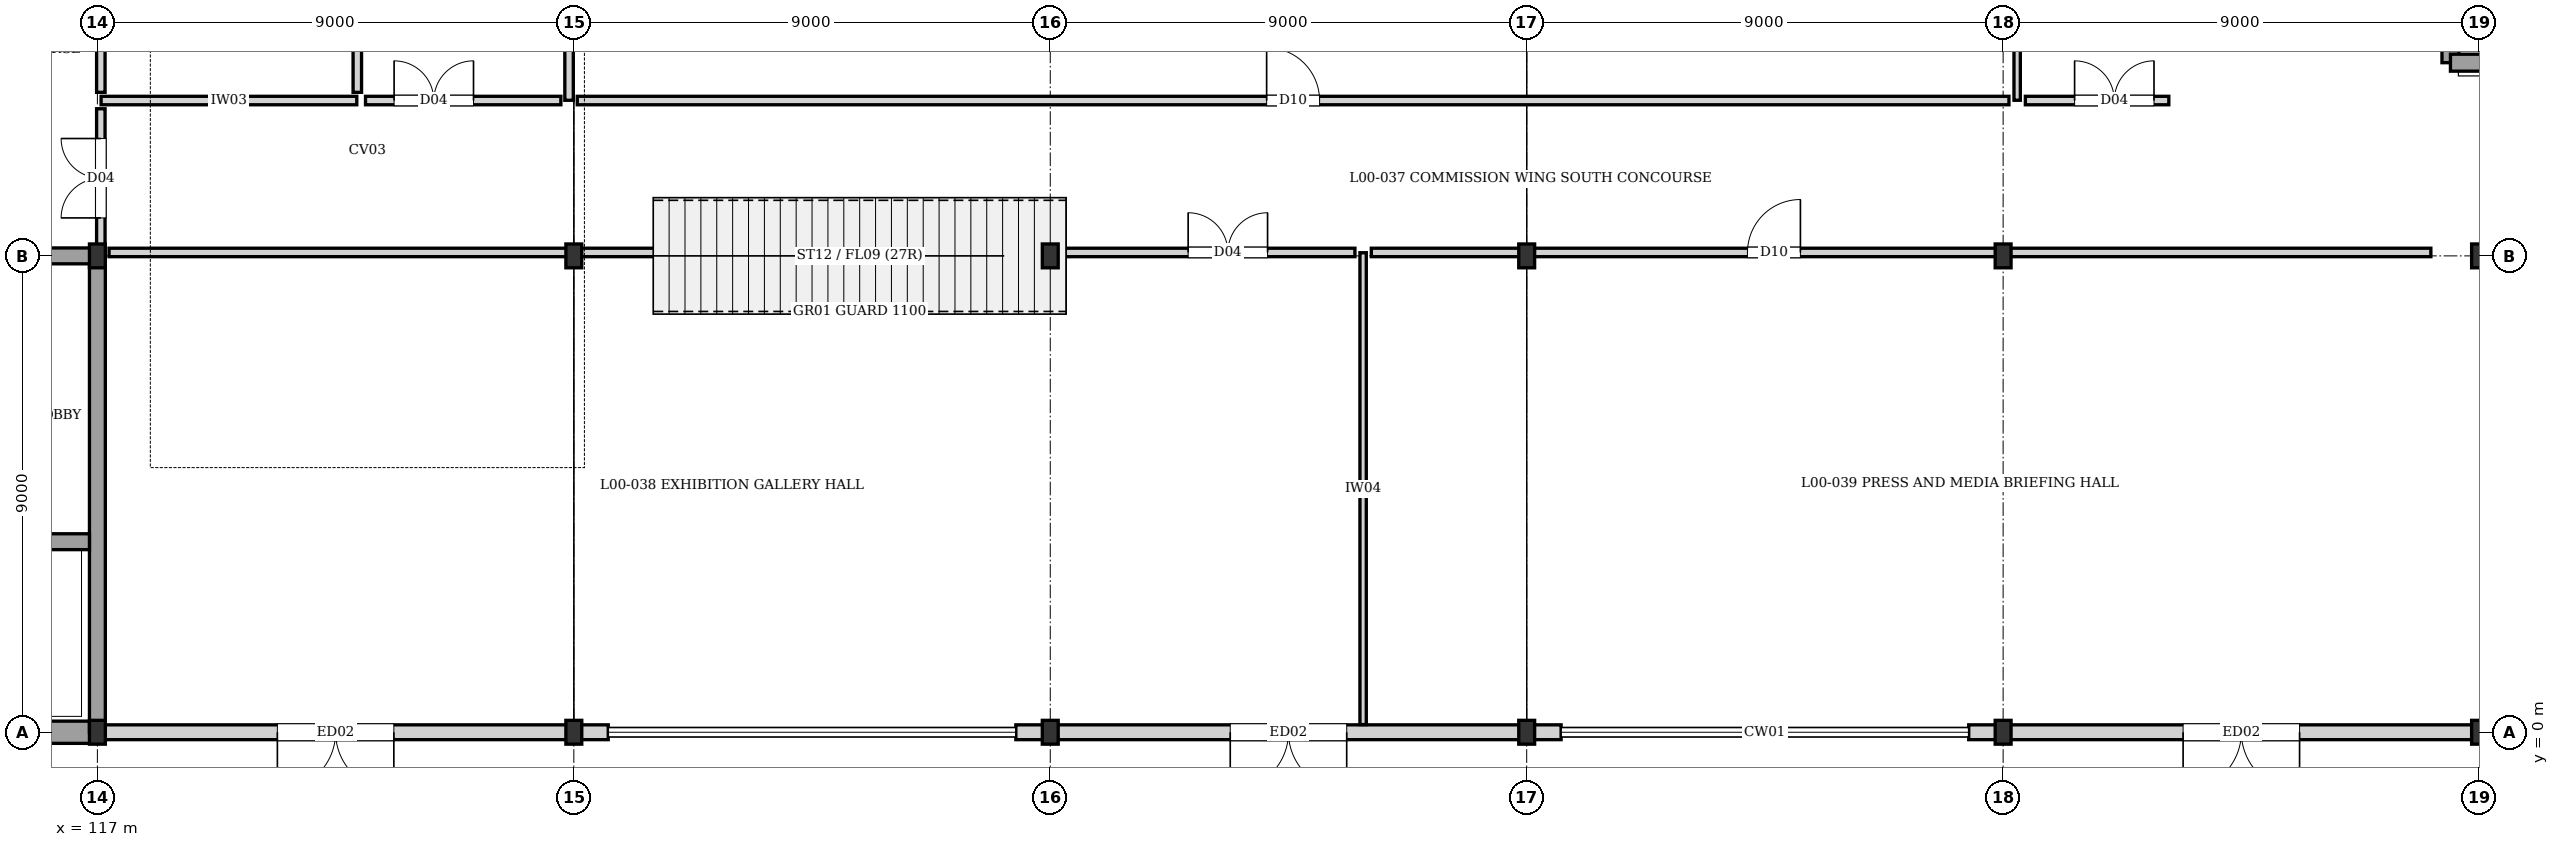
"""IFC4 building model, lengths in metres.
Left out: names, types, materials, properties, quantities, classifications, styles, units other than length and angle.
Written with IfcOpenShell. Run it as: python <this file> out.ifc"""

import sys

from ifc_helpers import new_model, si_unit, direction, frame, frame_2d, origin, origin_2d, place, context, subcontext, project, spatial, rectangle, i_section, extrude, element, fill, save


model = new_model("IFC4")
c1 = context("Model", 3, precision=1e-05, world=origin(), true_north=direction((0.0, 1.0)))
c2 = subcontext(c1, "Body", "Model", "MODEL_VIEW")
j1 = project(units=[si_unit("LENGTHUNIT", "METRE"), si_unit("PLANEANGLEUNIT", "RADIAN")], contexts=[c1])
p1 = place(None, origin())
s1 = spatial("IfcSite", under=j1, at=p1, CompositionType="ELEMENT")
p2 = place(p1, origin())
s2 = spatial("IfcBuilding", under=s1, at=p2, CompositionType="ELEMENT")
p3 = place(p2, origin())
s3 = spatial("IfcBuildingStorey", under=s2, at=p3, CompositionType="ELEMENT", Elevation=0.0)
for number, where, z_axis, x_axis in (
    (1, (117.0, 0.0, 0.0), (0.0, 0.0, 1.0), (1.0, 0.0, 0.0)),
    (2, (117.0, 9.0, 0.0), (0.0, 0.0, 1.0), (1.0, 0.0, 0.0)),
    (3, (126.0, 0.0, 0.0), (0.0, 0.0, 1.0), (1.0, 0.0, 0.0)),
    (4, (126.0, 9.0, 0.0), (0.0, 0.0, 1.0), (1.0, 0.0, 0.0)),
    (5, (135.0, 0.0, 0.0), (0.0, 0.0, 1.0), (1.0, 0.0, 0.0)),
    (6, (135.0, 9.0, 0.0), (0.0, 0.0, 1.0), (1.0, 0.0, 0.0)),
    (7, (144.0, 0.0, 0.0), (0.0, 0.0, 1.0), (1.0, 0.0, 0.0)),
    (8, (144.0, 9.0, 0.0), (0.0, 0.0, 1.0), (1.0, 0.0, 0.0)),
    (9, (153.0, 0.0, 0.0), (0.0, 0.0, 1.0), (1.0, 0.0, 0.0)),
    (10, (153.0, 9.0, 0.0), (0.0, 0.0, 1.0), (1.0, 0.0, 0.0)),
    (11, (162.0, 0.0, 0.0), (0.0, 0.0, 1.0), (1.0, 0.0, 0.0)),
    (12, (162.0, 9.0, 0.0), (0.0, 0.0, 1.0), (1.0, 0.0, 0.0)),
):
    element("IfcColumn", number, at=place(p3, frame(where, z_axis=z_axis, x_axis=x_axis)), inside=s3, PredefinedType="COLUMN", context=c2, shape_type="SweptSolid", body=[
        extrude(i_section(OverallWidth=0.3, OverallDepth=0.45, WebThickness=0.014, FlangeThickness=0.026, at=origin_2d()), origin(), (0.0, 0.0, 1.0), 4.32),
    ])
p4 = place(p3, frame((162.0, 0.0, 0.0), z_axis=(0.0, 0.0, 1.0), x_axis=(-1.0, 0.0, 0.0)))
e13 = element("IfcWall", 13, at=p4, inside=s3, PredefinedType="SOLIDWALL", context=c2, shape_type="SweptSolid", body=[
    extrude(rectangle(XDim=9.0, YDim=0.28, at=frame_2d((4.5, 0.0))), origin(), (0.0, 0.0, 1.0), 3.655),
])
p5 = place(p4, frame((3.4, 0.0, 0.0)))
e14 = element("IfcOpeningElement", 14, at=p5, cuts=e13, PredefinedType="OPENING", context=c2, shape_type="SweptSolid", body=[
    extrude(rectangle(XDim=2.2, YDim=2.5, at=frame_2d((1.1, 1.25))), frame((0.0, 0.15, 0.0), z_axis=(0.0, -1.0, 0.0), x_axis=(1.0, 0.0, 0.0)), (0.0, 0.0, 1.0), 0.3),
])
for number, where, z_axis, x_axis in (
    (15, (153.0, 0.0, 0.0), (0.0, 0.0, 1.0), (-1.0, 0.0, 0.0)),
    (16, (144.65, 0.0, 0.0), (0.0, 0.0, 1.0), (-1.0, 0.0, 0.0)),
):
    element("IfcWall", number, at=place(p3, frame(where, z_axis=z_axis, x_axis=x_axis)), inside=s3, PredefinedType="SOLIDWALL", context=c2, shape_type="SweptSolid", body=[
        extrude(rectangle(XDim=0.65, YDim=0.28, at=frame_2d((0.325, 0.0))), origin(), (0.0, 0.0, 1.0), 3.695),
    ])
p6 = place(p3, frame((144.0, 0.0, 0.0), z_axis=(0.0, 0.0, 1.0), x_axis=(-1.0, 0.0, 0.0)))
e17 = element("IfcWall", 17, at=p6, inside=s3, PredefinedType="SOLIDWALL", context=c2, shape_type="SweptSolid", body=[
    extrude(rectangle(XDim=9.0, YDim=0.28, at=frame_2d((4.5, 0.0))), origin(), (0.0, 0.0, 1.0), 3.755),
])
p7 = place(p6, frame((3.4, 0.0, 0.0)))
e18 = element("IfcOpeningElement", 18, at=p7, cuts=e17, PredefinedType="OPENING", context=c2, shape_type="SweptSolid", body=[
    extrude(rectangle(XDim=2.2, YDim=2.5, at=frame_2d((1.1, 1.25))), frame((0.0, 0.15, 0.0), z_axis=(0.0, -1.0, 0.0), x_axis=(1.0, 0.0, 0.0)), (0.0, 0.0, 1.0), 0.3),
])
for number, where, z_axis, x_axis in (
    (19, (135.0, 0.0, 0.0), (0.0, 0.0, 1.0), (-1.0, 0.0, 0.0)),
    (20, (126.65, 0.0, 0.0), (0.0, 0.0, 1.0), (-1.0, 0.0, 0.0)),
):
    element("IfcWall", number, at=place(p3, frame(where, z_axis=z_axis, x_axis=x_axis)), inside=s3, PredefinedType="SOLIDWALL", context=c2, shape_type="SweptSolid", body=[
        extrude(rectangle(XDim=0.65, YDim=0.28, at=frame_2d((0.325, 0.0))), origin(), (0.0, 0.0, 1.0), 3.825),
    ])
p8 = place(p3, frame((126.0, 0.0, 0.0), z_axis=(0.0, 0.0, 1.0), x_axis=(-1.0, 0.0, 0.0)))
e21 = element("IfcWall", 21, at=p8, inside=s3, PredefinedType="SOLIDWALL", context=c2, shape_type="SweptSolid", body=[
    extrude(rectangle(XDim=8.87, YDim=0.28, at=frame_2d((4.435, 0.0))), origin(), (0.0, 0.0, 1.0), 3.655),
])
p9 = place(p8, frame((3.4, 0.0, 0.0)))
e22 = element("IfcOpeningElement", 22, at=p9, cuts=e21, PredefinedType="OPENING", context=c2, shape_type="SweptSolid", body=[
    extrude(rectangle(XDim=2.2, YDim=2.5, at=frame_2d((1.1, 1.25))), frame((0.0, 0.15, 0.0), z_axis=(0.0, -1.0, 0.0), x_axis=(1.0, 0.0, 0.0)), (0.0, 0.0, 1.0), 0.3),
])
p10 = place(p3, frame((117.0, 0.0, 0.0), z_axis=(0.0, 0.0, 1.0), x_axis=(-1.0, 0.0, 0.0)))
e23 = element("IfcWall", 23, at=p10, inside=s3, PredefinedType="SOLIDWALL", context=c2, shape_type="SweptSolid", body=[
    extrude(rectangle(XDim=9.0, YDim=0.42, at=frame_2d((4.5, 0.0))), origin(), (0.0, 0.0, 1.0), 4.055),
])
p11 = place(p3, frame((117.0, 0.0, 0.0), z_axis=(0.0, 0.0, 1.0), x_axis=(0.0, 1.0, 0.0)))
e24 = element("IfcWall", 24, at=p11, inside=s3, PredefinedType="SHEAR", context=c2, shape_type="SweptSolid", body=[
    extrude(rectangle(XDim=9.0, YDim=0.3, at=frame_2d((4.5, 0.0))), origin(), (0.0, 0.0, 1.0), 4.055),
])
p12 = place(p3, frame((108.0, 9.0, 0.0), z_axis=(0.0, 0.0, 1.0), x_axis=(1.0, 0.0, 0.0)))
e25 = element("IfcWall", 25, at=p12, inside=s3, PredefinedType="SHEAR", context=c2, shape_type="SweptSolid", body=[
    extrude(rectangle(XDim=9.0, YDim=0.3, at=frame_2d((4.5, 0.0))), origin(), (0.0, 0.0, 1.0), 4.055),
])
p13 = place(p12, frame((6.05, 0.0, 0.0)))
e26 = element("IfcOpeningElement", 26, at=p13, cuts=e25, PredefinedType="OPENING", context=c2, shape_type="SweptSolid", body=[
    extrude(rectangle(XDim=1.4, YDim=2.02, at=frame_2d((0.7, 1.01))), frame((0.0, 0.16, 0.0), z_axis=(0.0, -1.0, 0.0), x_axis=(1.0, 0.0, 0.0)), (0.0, 0.0, 1.0), 0.32),
])
p14 = place(p3, frame((112.65, 3.6, 0.0), z_axis=(0.0, 0.0, 1.0), x_axis=(1.0, 0.0, 0.0)))
e27 = element("IfcWall", 27, at=p14, inside=s3, PredefinedType="SHEAR", context=c2, shape_type="SweptSolid", body=[
    extrude(rectangle(XDim=4.2, YDim=0.3, at=frame_2d((2.1, 0.0))), origin(), (0.0, 0.0, 1.0), 4.055),
])
p15 = place(p14, frame((1.5, 0.0, 0.0)))
e28 = element("IfcOpeningElement", 28, at=p15, cuts=e27, PredefinedType="OPENING", context=c2, shape_type="SweptSolid", body=[
    extrude(rectangle(XDim=1.2, YDim=2.2, at=frame_2d((0.6, 1.1))), frame((0.0, 0.16, 0.0), z_axis=(0.0, -1.0, 0.0), x_axis=(1.0, 0.0, 0.0)), (0.0, 0.0, 1.0), 0.32),
])
p16 = place(p3, frame((161.45, 12.65, 0.0), z_axis=(0.0, 0.0, 1.0), x_axis=(0.0, 1.0, 0.0)))
e29 = element("IfcWall", 29, at=p16, inside=s3, PredefinedType="SHEAR", context=c2, shape_type="SweptSolid", body=[
    extrude(rectangle(XDim=32.35, YDim=0.32, at=frame_2d((16.175, 0.0))), origin(), (0.0, 0.0, 1.0), 4.055),
])
p17 = place(p3, frame((161.45, 12.65, 0.0), z_axis=(0.0, 0.0, 1.0), x_axis=(1.0, 0.0, 0.0)))
e30 = element("IfcWall", 30, at=p17, inside=s3, PredefinedType="SHEAR", context=c2, shape_type="SweptSolid", body=[
    extrude(rectangle(XDim=6.55, YDim=0.32, at=frame_2d((3.275, 0.0))), origin(), (0.0, 0.0, 1.0), 4.055),
])
p18 = place(p3, frame((117.07, 11.935, 0.0), z_axis=(0.0, 0.0, 1.0), x_axis=(1.0, 0.0, 0.0)))
e31 = element("IfcWall", 31, at=p18, inside=s3, PredefinedType="PARTITIONING", context=c2, shape_type="SweptSolid", body=[
    extrude(rectangle(XDim=4.83, YDim=0.16, at=frame_2d((2.415, 0.0))), origin(), (0.0, 0.0, 1.0), 4.055),
])
p19 = place(p3, frame((153.265, 11.94, 0.0), z_axis=(0.0, 0.0, 1.0), x_axis=(0.0, 1.0, 0.0)))
e32 = element("IfcWall", 32, at=p19, inside=s3, PredefinedType="PARTITIONING", context=c2, shape_type="SweptSolid", body=[
    extrude(rectangle(XDim=5.915, YDim=0.12, at=frame_2d((2.958, 0.0))), origin(), (0.0, 0.0, 1.0), 4.055),
])
p20 = place(p3, frame((140.91, 0.145, 0.0), z_axis=(0.0, 0.0, 1.0), x_axis=(0.0, 1.0, 0.0)))
e33 = element("IfcWall", 33, at=p20, inside=s3, PredefinedType="PARTITIONING", context=c2, shape_type="SweptSolid", body=[
    extrude(rectangle(XDim=8.915, YDim=0.12, at=frame_2d((4.458, 0.0))), origin(), (0.0, 0.0, 1.0), 4.055),
])
p21 = place(p3, frame((121.91, 12.09, 0.0), z_axis=(0.0, 0.0, 1.0), x_axis=(0.0, 1.0, 0.0)))
e34 = element("IfcWall", 34, at=p21, inside=s3, PredefinedType="PARTITIONING", context=c2, shape_type="SweptSolid", body=[
    extrude(rectangle(XDim=5.82, YDim=0.16, at=frame_2d((2.91, 0.0))), origin(), (0.0, 0.0, 1.0), 4.055),
])
p22 = place(p3, frame((125.91, 11.94, 0.0), z_axis=(0.0, 0.0, 1.0), x_axis=(0.0, 1.0, 0.0)))
e35 = element("IfcWall", 35, at=p22, inside=s3, PredefinedType="PARTITIONING", context=c2, shape_type="SweptSolid", body=[
    extrude(rectangle(XDim=5.915, YDim=0.16, at=frame_2d((2.958, 0.0))), origin(), (0.0, 0.0, 1.0), 3.615),
])
p23 = place(p3, frame((117.065, 9.155, 0.0), z_axis=(0.0, 0.0, 1.0), x_axis=(0.0, 1.0, 0.0)))
e36 = element("IfcWall", 36, at=p23, inside=s3, PredefinedType="PARTITIONING", context=c2, shape_type="SweptSolid", body=[
    extrude(rectangle(XDim=2.625, YDim=0.16, at=frame_2d((1.312, 0.0))), origin(), (0.0, 0.0, 1.0), 3.665),
])
p24 = place(p23, frame((0.562, 0.0, 0.0)))
e37 = element("IfcOpeningElement", 37, at=p24, cuts=e36, PredefinedType="OPENING", context=c2, shape_type="SweptSolid", body=[
    extrude(rectangle(XDim=1.5, YDim=2.1, at=frame_2d((0.75, 1.05))), frame((0.0, 0.09, 0.0), z_axis=(0.0, -1.0, 0.0), x_axis=(1.0, 0.0, 0.0)), (0.0, 0.0, 1.0), 0.18),
])
p25 = place(p3, frame((117.065, 12.09, 0.0), z_axis=(0.0, 0.0, 1.0), x_axis=(0.0, 1.0, 0.0)))
e38 = element("IfcWall", 38, at=p25, inside=s3, PredefinedType="PARTITIONING", context=c2, shape_type="SweptSolid", body=[
    extrude(rectangle(XDim=5.82, YDim=0.16, at=frame_2d((2.91, 0.0))), origin(), (0.0, 0.0, 1.0), 3.665),
])
p26 = place(p25, frame((1.712, 0.0, 0.0)))
e39 = element("IfcOpeningElement", 39, at=p26, cuts=e38, PredefinedType="OPENING", context=c2, shape_type="SweptSolid", body=[
    extrude(rectangle(XDim=1.0, YDim=2.1, at=frame_2d((0.5, 1.05))), frame((0.0, 0.09, 0.0), z_axis=(0.0, -1.0, 0.0), x_axis=(1.0, 0.0, 0.0)), (0.0, 0.0, 1.0), 0.18),
])
p27 = place(p3, frame((153.42, 11.935, 0.0), z_axis=(0.0, 0.0, 1.0), x_axis=(1.0, 0.0, 0.0)))
e40 = element("IfcWall", 40, at=p27, inside=s3, PredefinedType="PARTITIONING", context=c2, shape_type="SweptSolid", body=[
    extrude(rectangle(XDim=2.71, YDim=0.16, at=frame_2d((1.355, 0.0))), origin(), (0.0, 0.0, 1.0), 4.055),
])
p28 = place(p27, frame((0.93, 0.0, 0.0)))
e41 = element("IfcOpeningElement", 41, at=p28, cuts=e40, PredefinedType="OPENING", context=c2, shape_type="SweptSolid", body=[
    extrude(rectangle(XDim=1.5, YDim=2.1, at=frame_2d((0.75, 1.05))), frame((0.0, 0.09, 0.0), z_axis=(0.0, -1.0, 0.0), x_axis=(1.0, 0.0, 0.0)), (0.0, 0.0, 1.0), 0.18),
])
p29 = place(p3, frame((117.22, 9.065, 0.0), z_axis=(0.0, 0.0, 1.0), x_axis=(1.0, 0.0, 0.0)))
e42 = element("IfcWall", 42, at=p29, inside=s3, PredefinedType="PARTITIONING", context=c2, shape_type="SweptSolid", body=[
    extrude(rectangle(XDim=8.76, YDim=0.16, at=frame_2d((4.38, 0.0))), origin(), (0.0, 0.0, 1.0), 3.505),
])
p30 = place(p3, frame((141.065, 9.065, 0.0), z_axis=(0.0, 0.0, 1.0), x_axis=(1.0, 0.0, 0.0)))
e43 = element("IfcWall", 43, at=p30, inside=s3, PredefinedType="PARTITIONING", context=c2, shape_type="SweptSolid", body=[
    extrude(rectangle(XDim=2.955, YDim=0.16, at=frame_2d((1.478, 0.0))), origin(), (0.0, 0.0, 1.0), 4.055),
])
p31 = place(p3, frame((126.065, 11.935, 0.0), z_axis=(0.0, 0.0, 1.0), x_axis=(1.0, 0.0, 0.0)))
e44 = element("IfcWall", 44, at=p31, inside=s3, PredefinedType="PARTITIONING", context=c2, shape_type="SweptSolid", body=[
    extrude(rectangle(XDim=27.045, YDim=0.16, at=frame_2d((13.522, 0.0))), origin(), (0.0, 0.0, 1.0), 4.055),
])
p32 = place(p31, frame((13.022, 0.0, 0.0)))
e45 = element("IfcOpeningElement", 45, at=p32, cuts=e44, PredefinedType="OPENING", context=c2, shape_type="SweptSolid", body=[
    extrude(rectangle(XDim=1.0, YDim=2.1, at=frame_2d((0.5, 1.05))), frame((0.0, 0.09, 0.0), z_axis=(0.0, -1.0, 0.0), x_axis=(1.0, 0.0, 0.0)), (0.0, 0.0, 1.0), 0.18),
])
p33 = place(p3, frame((122.065, 11.935, 0.0), z_axis=(0.0, 0.0, 1.0), x_axis=(1.0, 0.0, 0.0)))
e46 = element("IfcWall", 46, at=p33, inside=s3, PredefinedType="PARTITIONING", context=c2, shape_type="SweptSolid", body=[
    extrude(rectangle(XDim=3.69, YDim=0.16, at=frame_2d((1.845, 0.0))), origin(), (0.0, 0.0, 1.0), 4.055),
])
p34 = place(p33, frame((0.54, 0.0, 0.0)))
e47 = element("IfcOpeningElement", 47, at=p34, cuts=e46, PredefinedType="OPENING", context=c2, shape_type="SweptSolid", body=[
    extrude(rectangle(XDim=1.5, YDim=2.1, at=frame_2d((0.75, 1.05))), frame((0.0, 0.09, 0.0), z_axis=(0.0, -1.0, 0.0), x_axis=(1.0, 0.0, 0.0)), (0.0, 0.0, 1.0), 0.18),
])
p35 = place(p3, frame((125.98, 9.065, 0.0), z_axis=(0.0, 0.0, 1.0), x_axis=(1.0, 0.0, 0.0)))
e48 = element("IfcWall", 48, at=p35, inside=s3, PredefinedType="PARTITIONING", context=c2, shape_type="SweptSolid", body=[
    extrude(rectangle(XDim=14.775, YDim=0.16, at=frame_2d((7.387, 0.0))), origin(), (0.0, 0.0, 1.0), 4.055),
])
p36 = place(p35, frame((11.625, 0.0, 0.0)))
e49 = element("IfcOpeningElement", 49, at=p36, cuts=e48, PredefinedType="OPENING", context=c2, shape_type="SweptSolid", body=[
    extrude(rectangle(XDim=1.5, YDim=2.1, at=frame_2d((0.75, 1.05))), frame((0.0, 0.09, 0.0), z_axis=(0.0, -1.0, 0.0), x_axis=(1.0, 0.0, 0.0)), (0.0, 0.0, 1.0), 0.18),
])
p37 = place(p3, frame((144.02, 9.065, 0.0), z_axis=(0.0, 0.0, 1.0), x_axis=(1.0, 0.0, 0.0)))
e50 = element("IfcWall", 50, at=p37, inside=s3, PredefinedType="PARTITIONING", context=c2, shape_type="SweptSolid", body=[
    extrude(rectangle(XDim=8.96, YDim=0.16, at=frame_2d((4.48, 0.0))), origin(), (0.0, 0.0, 1.0), 3.765),
])
p38 = place(p37, frame((4.151, 0.0, 0.0)))
e51 = element("IfcOpeningElement", 51, at=p38, cuts=e50, PredefinedType="OPENING", context=c2, shape_type="SweptSolid", body=[
    extrude(rectangle(XDim=1.0, YDim=2.1, at=frame_2d((0.5, 1.05))), frame((0.0, 0.09, 0.0), z_axis=(0.0, -1.0, 0.0), x_axis=(1.0, 0.0, 0.0)), (0.0, 0.0, 1.0), 0.18),
])
p39 = place(p3, frame((152.98, 9.065, 0.0), z_axis=(0.0, 0.0, 1.0), x_axis=(1.0, 0.0, 0.0)))
e52 = element("IfcWall", 52, at=p39, inside=s3, PredefinedType="PARTITIONING", context=c2, shape_type="SweptSolid", body=[
    extrude(rectangle(XDim=8.1, YDim=0.16, at=frame_2d((4.05, 0.0))), origin(), (0.0, 0.0, 1.0), 3.725),
])
p40 = place(p5, origin())
e53 = element("IfcDoor", 53, at=p40, inside=s3, OperationType="DOUBLE_DOOR_SINGLE_SWING", PredefinedType="DOOR", context=c2, shape_type="SweptSolid", body=[
    extrude(rectangle(XDim=2.2, YDim=2.5, at=frame_2d((1.1, 1.25))), frame((0.0, 0.025, 0.0), z_axis=(0.0, -1.0, 0.0), x_axis=(1.0, 0.0, 0.0)), (0.0, 0.0, 1.0), 0.05),
])
fill(e14, e53)
p41 = place(p7, origin())
e54 = element("IfcDoor", 54, at=p41, inside=s3, OperationType="DOUBLE_DOOR_SINGLE_SWING", PredefinedType="DOOR", context=c2, shape_type="SweptSolid", body=[
    extrude(rectangle(XDim=2.2, YDim=2.5, at=frame_2d((1.1, 1.25))), frame((0.0, 0.025, 0.0), z_axis=(0.0, -1.0, 0.0), x_axis=(1.0, 0.0, 0.0)), (0.0, 0.0, 1.0), 0.05),
])
fill(e18, e54)
p42 = place(p9, origin())
e55 = element("IfcDoor", 55, at=p42, inside=s3, OperationType="DOUBLE_DOOR_SINGLE_SWING", PredefinedType="DOOR", context=c2, shape_type="SweptSolid", body=[
    extrude(rectangle(XDim=2.2, YDim=2.5, at=frame_2d((1.1, 1.25))), frame((0.0, 0.025, 0.0), z_axis=(0.0, -1.0, 0.0), x_axis=(1.0, 0.0, 0.0)), (0.0, 0.0, 1.0), 0.05),
])
fill(e22, e55)
p43 = place(p24, origin())
e56 = element("IfcDoor", 56, at=p43, inside=s3, OperationType="DOUBLE_DOOR_SINGLE_SWING", PredefinedType="DOOR", context=c2, shape_type="SweptSolid", body=[
    extrude(rectangle(XDim=1.5, YDim=2.1, at=frame_2d((0.75, 1.05))), frame((0.0, 0.025, 0.0), z_axis=(0.0, -1.0, 0.0), x_axis=(1.0, 0.0, 0.0)), (0.0, 0.0, 1.0), 0.05),
])
fill(e37, e56)
p44 = place(p28, origin())
e57 = element("IfcDoor", 57, at=p44, inside=s3, OperationType="DOUBLE_DOOR_SINGLE_SWING", PredefinedType="DOOR", context=c2, shape_type="SweptSolid", body=[
    extrude(rectangle(XDim=1.5, YDim=2.1, at=frame_2d((0.75, 1.05))), frame((0.0, 0.025, 0.0), z_axis=(0.0, -1.0, 0.0), x_axis=(1.0, 0.0, 0.0)), (0.0, 0.0, 1.0), 0.05),
])
fill(e41, e57)
p45 = place(p36, origin())
e58 = element("IfcDoor", 58, at=p45, inside=s3, OperationType="DOUBLE_DOOR_SINGLE_SWING", PredefinedType="DOOR", context=c2, shape_type="SweptSolid", body=[
    extrude(rectangle(XDim=1.5, YDim=2.1, at=frame_2d((0.75, 1.05))), frame((0.0, 0.025, 0.0), z_axis=(0.0, -1.0, 0.0), x_axis=(1.0, 0.0, 0.0)), (0.0, 0.0, 1.0), 0.05),
])
fill(e49, e58)
p46 = place(p38, origin())
e59 = element("IfcDoor", 59, at=p46, inside=s3, OperationType="SINGLE_SWING_RIGHT", PredefinedType="DOOR", context=c2, shape_type="SweptSolid", body=[
    extrude(rectangle(XDim=1.0, YDim=2.1, at=frame_2d((0.5, 1.05))), frame((0.0, 0.025, 0.0), z_axis=(0.0, -1.0, 0.0), x_axis=(1.0, 0.0, 0.0)), (0.0, 0.0, 1.0), 0.05),
])
fill(e51, e59)
p47 = place(p32, origin())
e60 = element("IfcDoor", 60, at=p47, inside=s3, OperationType="SINGLE_SWING_LEFT", PredefinedType="DOOR", context=c2, shape_type="SweptSolid", body=[
    extrude(rectangle(XDim=1.0, YDim=2.1, at=frame_2d((0.5, 1.05))), frame((0.0, 0.025, 0.0), z_axis=(0.0, -1.0, 0.0), x_axis=(1.0, 0.0, 0.0)), (0.0, 0.0, 1.0), 0.05),
])
fill(e45, e60)
p48 = place(p34, origin())
e61 = element("IfcDoor", 61, at=p48, inside=s3, OperationType="DOUBLE_DOOR_SINGLE_SWING", PredefinedType="DOOR", context=c2, shape_type="SweptSolid", body=[
    extrude(rectangle(XDim=1.5, YDim=2.1, at=frame_2d((0.75, 1.05))), frame((0.0, 0.025, 0.0), z_axis=(0.0, -1.0, 0.0), x_axis=(1.0, 0.0, 0.0)), (0.0, 0.0, 1.0), 0.05),
])
fill(e47, e61)
save(model, sys.argv[1])
